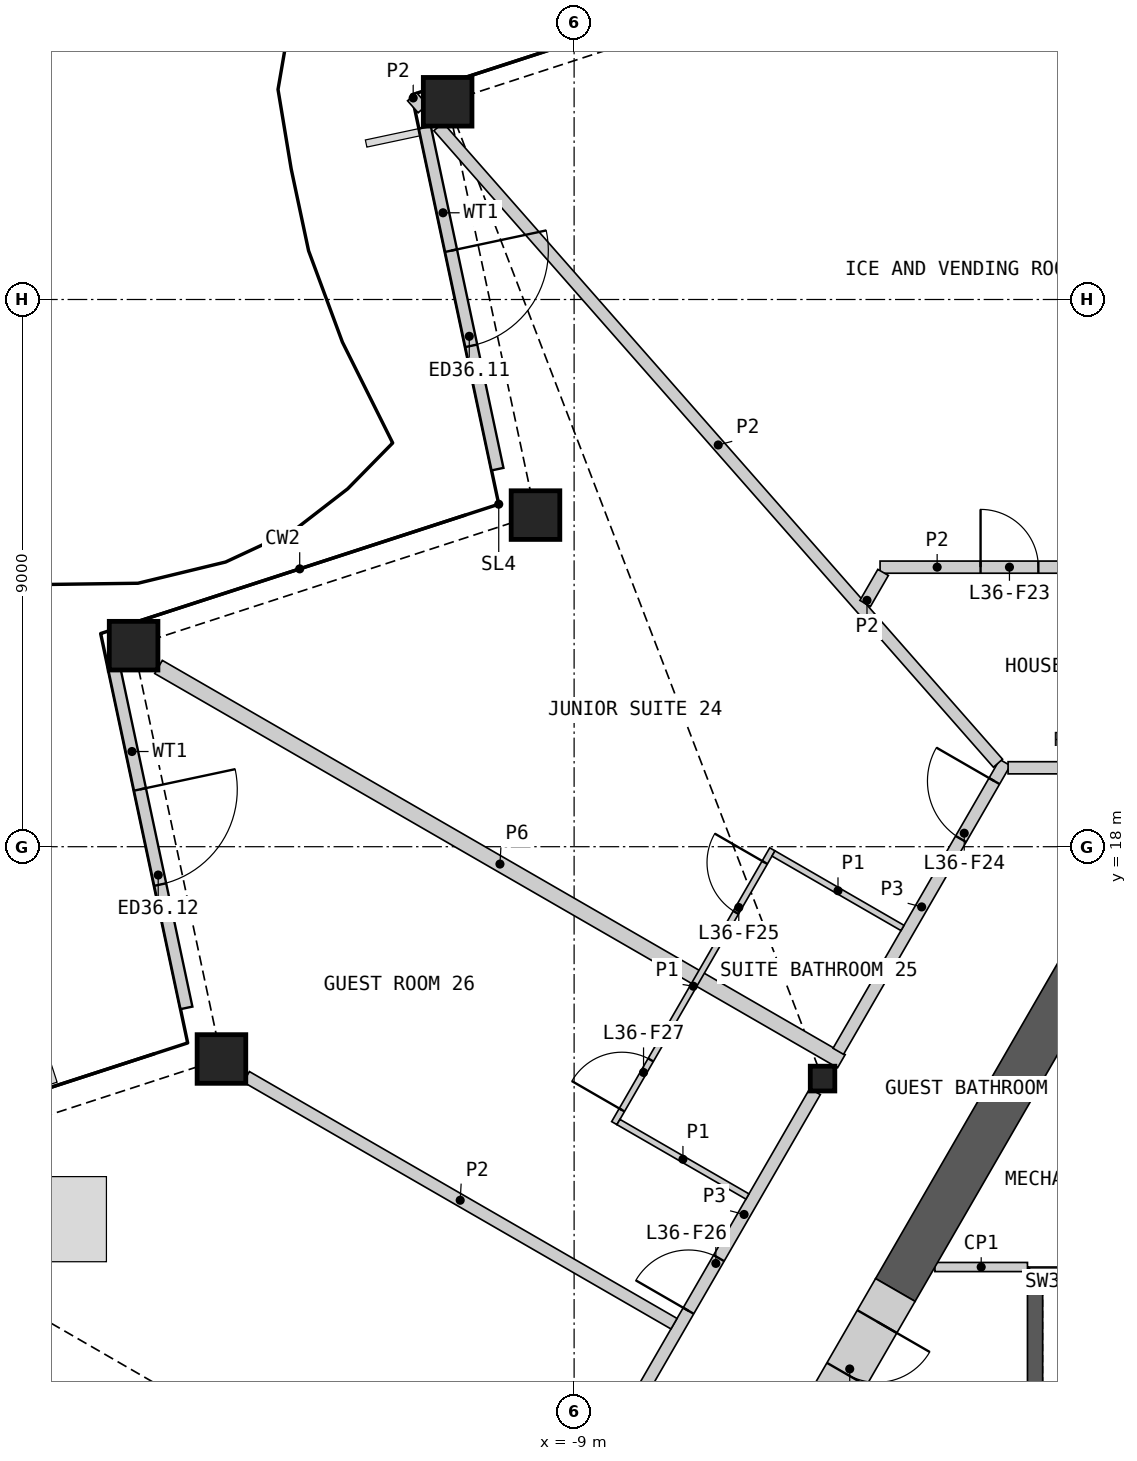
"""IFC4 building model, lengths in metres.
Left out: names, types, materials, properties, quantities, classifications, styles, units other than length and angle.
Written with IfcOpenShell. Run it as: python <this file> out.ifc"""

import sys

from ifc_helpers import new_model, si_unit, direction, frame, frame_2d, origin, origin_2d, place, context, subcontext, project, spatial, polyline, rectangle, hollow_rectangle, i_section, outline, extrude, element, fill, save


model = new_model("IFC4")
c1 = context("Model", 3, precision=1e-05, world=origin(), true_north=direction((0.0, 1.0)))
c2 = subcontext(c1, "Body", "Model", "MODEL_VIEW")
j1 = project(units=[si_unit("LENGTHUNIT", "METRE"), si_unit("PLANEANGLEUNIT", "RADIAN")], contexts=[c1])
p1 = place(None, origin())
s1 = spatial("IfcSite", under=j1, at=p1, CompositionType="ELEMENT")
p2 = place(p1, origin())
s2 = spatial("IfcBuilding", under=s1, at=p2, CompositionType="ELEMENT")
p3 = place(p2, frame((0.0, 0.0, 172.8)))
s3 = spatial("IfcBuildingStorey", under=s2, at=p3, CompositionType="ELEMENT", Elevation=172.8)
for number, where, z_axis, x_axis in (
    (1, (-11.08, 30.252, 0.0), (0.0, 0.0, 1.0), (1.0, 0.0, 0.0)),
    (2, (-9.635, 23.454, 0.0), (0.0, 0.0, 1.0), (1.0, 0.0, 0.0)),
    (3, (-16.245, 21.306, 0.0), (0.0, 0.0, 1.0), (1.0, 0.0, 0.0)),
    (4, (-14.8, 14.508, 0.0), (0.0, 0.0, 1.0), (1.0, 0.0, 0.0)),
):
    element("IfcColumn", number, at=place(p3, frame(where, z_axis=z_axis, x_axis=x_axis)), inside=s3, PredefinedType="COLUMN", context=c2, shape_type="SweptSolid", body=[
        extrude(hollow_rectangle(XDim=0.8, YDim=0.8, WallThickness=0.05, at=origin_2d()), origin(), (0.0, 0.0, 1.0), 3.6),
    ])
p4 = place(p3, frame((-4.914, 14.186, 0.0), z_axis=(0.0, 0.0, 1.0), x_axis=(1.0, 0.0, 0.0)))
e5 = element("IfcColumn", 5, at=p4, inside=s3, PredefinedType="COLUMN", context=c2, shape_type="SweptSolid", body=[
    extrude(i_section(OverallWidth=0.404, OverallDepth=0.407, WebThickness=0.027, FlangeThickness=0.044, at=origin_2d()), origin(), (0.0, 0.0, 1.0), 3.6),
])
p5 = place(p3, frame((-11.455, 29.832, 0.0), z_axis=(0.0, 0.0, 1.0), x_axis=(0.207913110781, -0.97814729891, 0.0)))
e6 = element("IfcWall", 6, at=p5, inside=s3, PredefinedType="SOLIDWALL", context=c2, shape_type="SweptSolid", body=[
    extrude(rectangle(XDim=5.748, YDim=0.2, at=frame_2d((2.874, 0.0))), origin(), (0.0, 0.0, 1.0), 2.701),
])
p6 = place(p5, frame((2.074, 0.0, 0.0)))
e7 = element("IfcOpeningElement", 7, at=p6, cuts=e6, PredefinedType="OPENING", context=c2, shape_type="SweptSolid", body=[
    extrude(rectangle(XDim=1.6, YDim=2.4, at=frame_2d((0.8, 1.2))), frame((0.0, 0.11, 0.0), z_axis=(0.0, -1.0, 0.0), x_axis=(1.0, 0.0, 0.0)), (0.0, 0.0, 1.0), 0.22),
])
p7 = place(p3, frame((-16.571, 20.971, 0.0), z_axis=(0.0, 0.0, 1.0), x_axis=(0.207872471739, -0.978155936184, 0.0)))
e8 = element("IfcWall", 8, at=p7, inside=s3, PredefinedType="SOLIDWALL", context=c2, shape_type="SweptSolid", body=[
    extrude(rectangle(XDim=5.748, YDim=0.2, at=frame_2d((2.874, 0.0))), origin(), (0.0, 0.0, 1.0), 2.701),
])
p8 = place(p7, frame((2.074, 0.0, 0.0)))
e9 = element("IfcOpeningElement", 9, at=p8, cuts=e8, PredefinedType="OPENING", context=c2, shape_type="SweptSolid", body=[
    extrude(rectangle(XDim=1.6, YDim=2.4, at=frame_2d((0.8, 1.2))), frame((0.0, 0.11, 0.0), z_axis=(0.0, -1.0, 0.0), x_axis=(1.0, 0.0, 0.0)), (0.0, 0.0, 1.0), 0.22),
])
p9 = place(p3, origin())
e10 = element("IfcWall", 10, at=p9, inside=s3, PredefinedType="SHEAR", context=c2, shape_type="SweptSolid", body=[
    extrude(outline(polyline([(1.544, 11.087), (-1.544, 11.087), (-1.294, 10.837), (1.294, 10.837), (1.544, 11.087)])), origin(), (0.0, 0.0, 1.0), 3.25),
])
p10 = place(p3, origin())
e11 = element("IfcWall", 11, at=p10, inside=s3, PredefinedType="SHEAR", context=c2, shape_type="SweptSolid", body=[
    extrude(outline(polyline([(-1.294, 10.837), (-1.544, 11.087), (-1.544, 5.237), (-1.294, 5.237), (-1.294, 10.837)])), origin(), (0.0, 0.0, 1.0), 3.25),
])
p11 = place(p3, frame((-1.544, 11.087, 0.0), z_axis=(0.0, 0.0, 1.0), x_axis=(-1.0, 0.0, 0.0)))
e12 = element("IfcWall", 12, at=p11, inside=s3, PredefinedType="PARTITIONING", context=c2, shape_type="SweptSolid", body=[
    extrude(rectangle(XDim=1.522, YDim=0.15, at=frame_2d((0.761, 0.0))), origin(), (0.0, 0.0, 1.0), 3.25),
])
p12 = place(p3, frame((-0.325, 16.585, 0.0), z_axis=(0.0, 0.0, 1.0), x_axis=(-0.499993425452, -0.866029199568, 0.0)))
e13 = element("IfcWall", 13, at=p12, inside=s3, PredefinedType="SHEAR", context=c2, shape_type="SweptSolid", body=[
    extrude(rectangle(XDim=6.785, YDim=0.75, at=frame_2d((3.393, 0.0))), origin(), (0.0, 0.0, 1.0), 3.25),
])
p13 = place(p3, frame((-3.717, 10.709, 0.0), z_axis=(0.0, 0.0, 1.0), x_axis=(-0.50002983664, -0.866008176907, 0.0)))
e14 = element("IfcWall", 14, at=p13, inside=s3, PredefinedType="SHEAR", context=c2, shape_type="SweptSolid", body=[
    extrude(rectangle(XDim=2.2, YDim=0.75, at=frame_2d((1.1, 0.0))), origin(), (0.0, 0.0, 1.0), 3.25),
])
p14 = place(p13, frame((0.6, 0.0, 0.0)))
e15 = element("IfcOpeningElement", 15, at=p14, cuts=e14, PredefinedType="OPENING", context=c2, shape_type="SweptSolid", body=[
    extrude(rectangle(XDim=1.0, YDim=2.1, at=frame_2d((0.5, 1.05))), frame((0.0, 0.385, 0.0), z_axis=(0.0, -1.0, 0.0), x_axis=(1.0, 0.0, 0.0)), (0.0, 0.0, 1.0), 0.77),
])
p15 = place(p3, frame((-15.835, 20.956, 0.0), z_axis=(0.0, 0.0, 1.0), x_axis=(0.866029765546, -0.499992445131, 0.0)))
e16 = element("IfcWall", 16, at=p15, inside=s3, PredefinedType="PARTITIONING", context=c2, shape_type="SweptSolid", body=[
    extrude(rectangle(XDim=12.968, YDim=0.25, at=frame_2d((6.484, 0.0))), origin(), (0.0, 0.0, 1.0), 2.404),
])
p16 = place(p3, frame((-9.705, 5.888, 0.0), z_axis=(0.0, 0.0, 1.0), x_axis=(0.50000393355, 0.866023132736, 0.0)))
e17 = element("IfcWall", 17, at=p16, inside=s3, PredefinedType="PARTITIONING", context=c2, shape_type="SweptSolid", body=[
    extrude(rectangle(XDim=9.335, YDim=0.2, at=frame_2d((4.667, 0.0))), origin(), (0.0, 0.0, 1.0), 3.25),
])
p17 = place(p16, frame((5.172, 0.0, 0.0)))
e18 = element("IfcOpeningElement", 18, at=p17, cuts=e17, PredefinedType="OPENING", context=c2, shape_type="SweptSolid", body=[
    extrude(rectangle(XDim=1.0, YDim=2.1, at=frame_2d((0.5, 1.05))), frame((0.0, 0.11, 0.0), z_axis=(0.0, -1.0, 0.0), x_axis=(1.0, 0.0, 0.0)), (0.0, 0.0, 1.0), 0.22),
])
p18 = place(p16, frame((1.556, 0.0, 0.0)))
e19 = element("IfcOpeningElement", 19, at=p18, cuts=e17, PredefinedType="OPENING", context=c2, shape_type="SweptSolid", body=[
    extrude(rectangle(XDim=1.8, YDim=2.1, at=frame_2d((0.9, 1.05))), frame((0.0, 0.11, 0.0), z_axis=(0.0, -1.0, 0.0), x_axis=(1.0, 0.0, 0.0)), (0.0, 0.0, 1.0), 0.22),
])
p19 = place(p3, frame((-4.655, 14.635, 0.0), z_axis=(0.0, 0.0, 1.0), x_axis=(0.499988331988, 0.866032140209, 0.0)))
e20 = element("IfcWall", 20, at=p19, inside=s3, PredefinedType="PARTITIONING", context=c2, shape_type="SweptSolid", body=[
    extrude(rectangle(XDim=5.485, YDim=0.2, at=frame_2d((2.742, 0.0))), origin(), (0.0, 0.0, 1.0), 3.25),
])
p20 = place(p19, frame((4.032, 0.0, 0.0)))
e21 = element("IfcOpeningElement", 21, at=p20, cuts=e20, PredefinedType="OPENING", context=c2, shape_type="SweptSolid", body=[
    extrude(rectangle(XDim=1.1, YDim=2.1, at=frame_2d((0.55, 1.05))), frame((0.0, 0.11, 0.0), z_axis=(0.0, -1.0, 0.0), x_axis=(1.0, 0.0, 0.0)), (0.0, 0.0, 1.0), 0.22),
])
p21 = place(p3, frame((-1.863, 19.298, 0.0), z_axis=(0.0, 0.0, 1.0), x_axis=(1.0, 0.0, 0.0)))
e22 = element("IfcWall", 22, at=p21, inside=s3, PredefinedType="PARTITIONING", context=c2, shape_type="SweptSolid", body=[
    extrude(rectangle(XDim=3.726, YDim=0.2, at=frame_2d((1.863, 0.0))), origin(), (0.0, 0.0, 1.0), 3.25),
])
p22 = place(p21, frame((1.388, 0.0, 0.0)))
e23 = element("IfcOpeningElement", 23, at=p22, cuts=e22, PredefinedType="OPENING", context=c2, shape_type="SweptSolid", body=[
    extrude(rectangle(XDim=0.95, YDim=2.1, at=frame_2d((0.475, 1.05))), frame((0.0, 0.11, 0.0), z_axis=(0.0, -1.0, 0.0), x_axis=(1.0, 0.0, 0.0)), (0.0, 0.0, 1.0), 0.22),
])
p23 = place(p3, frame((-11.231, 29.842, 0.0), z_axis=(0.0, 0.0, 1.0), x_axis=(0.66019067586, -0.751098043871, 0.0)))
e24 = element("IfcWall", 24, at=p23, inside=s3, PredefinedType="PARTITIONING", context=c2, shape_type="SweptSolid", body=[
    extrude(rectangle(XDim=13.938, YDim=0.2, at=frame_2d((6.969, 0.0))), origin(), (0.0, 0.0, 1.0), 2.404),
])
p24 = place(p3, frame((-14.39, 14.215, 0.0), z_axis=(0.0, 0.0, 1.0), x_axis=(0.86602738064, -0.499996575971, 0.0)))
e25 = element("IfcWall", 25, at=p24, inside=s3, PredefinedType="PARTITIONING", context=c2, shape_type="SweptSolid", body=[
    extrude(rectangle(XDim=8.121, YDim=0.2, at=frame_2d((4.06, 0.0))), origin(), (0.0, 0.0, 1.0), 2.404),
])
p25 = place(p3, frame((-3.968, 22.598, 0.0), z_axis=(0.0, 0.0, 1.0), x_axis=(1.0, 0.0, 0.0)))
e26 = element("IfcWall", 26, at=p25, inside=s3, PredefinedType="PARTITIONING", context=c2, shape_type="SweptSolid", body=[
    extrude(rectangle(XDim=3.755, YDim=0.2, at=frame_2d((1.877, 0.0))), origin(), (0.0, 0.0, 1.0), 2.404),
])
p26 = place(p25, frame((1.653, 0.0, 0.0)))
e27 = element("IfcOpeningElement", 27, at=p26, cuts=e26, PredefinedType="OPENING", context=c2, shape_type="SweptSolid", body=[
    extrude(rectangle(XDim=0.95, YDim=2.1, at=frame_2d((0.475, 1.05))), frame((0.0, 0.11, 0.0), z_axis=(0.0, -1.0, 0.0), x_axis=(1.0, 0.0, 0.0)), (0.0, 0.0, 1.0), 0.22),
])
p27 = place(p3, frame((-4.213, 22.001, 0.0), z_axis=(0.0, 0.0, 1.0), x_axis=(0.500105011351, 0.865964766963, 0.0)))
e28 = element("IfcWall", 28, at=p27, inside=s3, PredefinedType="PARTITIONING", context=c2, shape_type="SweptSolid", body=[
    extrude(rectangle(XDim=0.589, YDim=0.2, at=frame_2d((0.294, 0.0))), origin(), (0.0, 0.0, 1.0), 2.404),
])
p28 = place(p3, frame((-11.664, 30.335, 0.0), z_axis=(0.0, 0.0, 1.0), x_axis=(0.660272933047, -0.751025734503, 0.0)))
e29 = element("IfcWall", 29, at=p28, inside=s3, PredefinedType="PARTITIONING", context=c2, shape_type="SweptSolid", body=[
    extrude(rectangle(XDim=0.264, YDim=0.2, at=frame_2d((0.132, 0.0))), origin(), (0.0, 0.0, 1.0), 2.404),
])
p29 = place(p3, frame((-8.339, 13.454, 0.0), z_axis=(0.0, 0.0, 1.0), x_axis=(0.499992051641, 0.866029992723, 0.0)))
e30 = element("IfcWall", 30, at=p29, inside=s3, PredefinedType="PARTITIONING", context=c2, shape_type="SweptSolid", body=[
    extrude(rectangle(XDim=5.2, YDim=0.1, at=frame_2d((2.6, 0.0))), origin(), (0.0, 0.0, 1.0), 2.404),
])
p30 = place(p29, frame((4.0, 0.0, 0.0)))
e31 = element("IfcOpeningElement", 31, at=p30, cuts=e30, PredefinedType="OPENING", context=c2, shape_type="SweptSolid", body=[
    extrude(rectangle(XDim=0.95, YDim=2.1, at=frame_2d((0.475, 1.05))), frame((0.0, 0.06, 0.0), z_axis=(0.0, -1.0, 0.0), x_axis=(1.0, 0.0, 0.0)), (0.0, 0.0, 1.0), 0.12),
])
p31 = place(p29, frame((0.25, 0.0, 0.0)))
e32 = element("IfcOpeningElement", 32, at=p31, cuts=e30, PredefinedType="OPENING", context=c2, shape_type="SweptSolid", body=[
    extrude(rectangle(XDim=0.95, YDim=2.1, at=frame_2d((0.475, 1.05))), frame((0.0, 0.06, 0.0), z_axis=(0.0, -1.0, 0.0), x_axis=(1.0, 0.0, 0.0)), (0.0, 0.0, 1.0), 0.12),
])
p32 = place(p3, frame((-8.271, 13.472, 0.0), z_axis=(0.0, 0.0, 1.0), x_axis=(0.865989751695, -0.500061746146, 0.0)))
e33 = element("IfcWall", 33, at=p32, inside=s3, PredefinedType="PARTITIONING", context=c2, shape_type="SweptSolid", body=[
    extrude(rectangle(XDim=2.45, YDim=0.1, at=frame_2d((1.225, 0.0))), origin(), (0.0, 0.0, 1.0), 2.404),
])
p33 = place(p3, frame((-5.721, 17.889, 0.0), z_axis=(0.0, 0.0, 1.0), x_axis=(0.866014668023, -0.500018594424, 0.0)))
e34 = element("IfcWall", 34, at=p33, inside=s3, PredefinedType="PARTITIONING", context=c2, shape_type="SweptSolid", body=[
    extrude(rectangle(XDim=2.45, YDim=0.1, at=frame_2d((1.225, 0.0))), origin(), (0.0, 0.0, 1.0), 2.404),
])
p34 = place(p6, origin())
e35 = element("IfcDoor", 35, at=p34, inside=s3, OperationType="DOUBLE_DOOR_SINGLE_SWING", PredefinedType="DOOR", context=c2, shape_type="SweptSolid", body=[
    extrude(rectangle(XDim=1.6, YDim=2.4, at=frame_2d((0.8, 1.2))), frame((0.0, 0.025, 0.0), z_axis=(0.0, -1.0, 0.0), x_axis=(1.0, 0.0, 0.0)), (0.0, 0.0, 1.0), 0.05),
])
fill(e7, e35)
p35 = place(p8, origin())
e36 = element("IfcDoor", 36, at=p35, inside=s3, OperationType="DOUBLE_DOOR_SINGLE_SWING", PredefinedType="DOOR", context=c2, shape_type="SweptSolid", body=[
    extrude(rectangle(XDim=1.6, YDim=2.4, at=frame_2d((0.8, 1.2))), frame((0.0, 0.025, 0.0), z_axis=(0.0, -1.0, 0.0), x_axis=(1.0, 0.0, 0.0)), (0.0, 0.0, 1.0), 0.05),
])
fill(e9, e36)
p36 = place(p14, origin())
e37 = element("IfcDoor", 37, at=p36, inside=s3, OperationType="SINGLE_SWING_LEFT", PredefinedType="DOOR", context=c2, shape_type="SweptSolid", body=[
    extrude(rectangle(XDim=1.0, YDim=2.1, at=frame_2d((0.5, 1.05))), frame((0.0, 0.13, 0.0), z_axis=(0.0, -1.0, 0.0), x_axis=(1.0, 0.0, 0.0)), (0.0, 0.0, 1.0), 0.05),
])
fill(e15, e37)
p37 = place(p26, origin())
e38 = element("IfcDoor", 38, at=p37, inside=s3, OperationType="SINGLE_SWING_LEFT", PredefinedType="DOOR", context=c2, shape_type="SweptSolid", body=[
    extrude(rectangle(XDim=0.95, YDim=2.1, at=frame_2d((0.475, 1.05))), frame((0.0, 0.025, 0.0), z_axis=(0.0, -1.0, 0.0), x_axis=(1.0, 0.0, 0.0)), (0.0, 0.0, 1.0), 0.05),
])
fill(e27, e38)
p38 = place(p20, origin())
e39 = element("IfcDoor", 39, at=p38, inside=s3, OperationType="SINGLE_SWING_RIGHT", PredefinedType="DOOR", context=c2, shape_type="SweptSolid", body=[
    extrude(rectangle(XDim=1.1, YDim=2.1, at=frame_2d((0.55, 1.05))), frame((0.0, 0.025, 0.0), z_axis=(0.0, -1.0, 0.0), x_axis=(1.0, 0.0, 0.0)), (0.0, 0.0, 1.0), 0.05),
])
fill(e21, e39)
p39 = place(p30, origin())
e40 = element("IfcDoor", 40, at=p39, inside=s3, OperationType="SINGLE_SWING_RIGHT", PredefinedType="DOOR", context=c2, shape_type="SweptSolid", body=[
    extrude(rectangle(XDim=0.95, YDim=2.1, at=frame_2d((0.475, 1.05))), frame((0.0, 0.025, 0.0), z_axis=(0.0, -1.0, 0.0), x_axis=(1.0, 0.0, 0.0)), (0.0, 0.0, 1.0), 0.05),
])
fill(e31, e40)
p40 = place(p17, origin())
e41 = element("IfcDoor", 41, at=p40, inside=s3, OperationType="SINGLE_SWING_LEFT", PredefinedType="DOOR", context=c2, shape_type="SweptSolid", body=[
    extrude(rectangle(XDim=1.0, YDim=2.1, at=frame_2d((0.5, 1.05))), frame((0.0, 0.025, 0.0), z_axis=(0.0, -1.0, 0.0), x_axis=(1.0, 0.0, 0.0)), (0.0, 0.0, 1.0), 0.05),
])
fill(e18, e41)
p41 = place(p31, origin())
e42 = element("IfcDoor", 42, at=p41, inside=s3, OperationType="SINGLE_SWING_LEFT", PredefinedType="DOOR", context=c2, shape_type="SweptSolid", body=[
    extrude(rectangle(XDim=0.95, YDim=2.1, at=frame_2d((0.475, 1.05))), frame((0.0, 0.025, 0.0), z_axis=(0.0, -1.0, 0.0), x_axis=(1.0, 0.0, 0.0)), (0.0, 0.0, 1.0), 0.05),
])
fill(e32, e42)
save(model, sys.argv[1])
